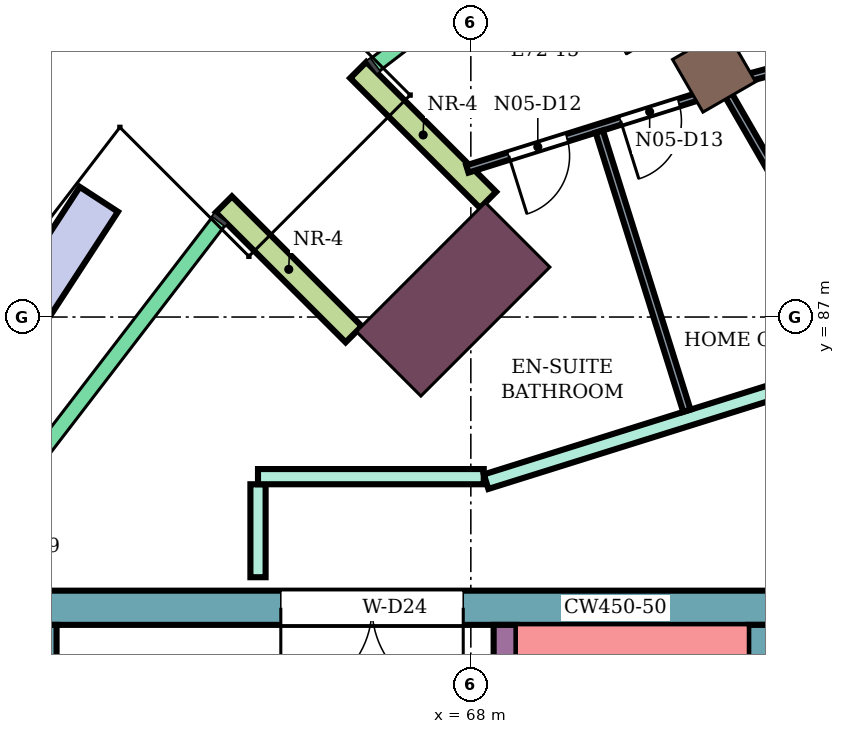
"""IFC4 building model, lengths in metres.
Left out: names, types, materials, properties, quantities, classifications, styles, units other than length and angle.
Written with IfcOpenShell. Run it as: python <this file> out.ifc"""

import sys

from ifc_helpers import new_model, si_unit, direction, frame, frame_2d, origin, origin_2d, place, context, subcontext, project, spatial, rectangle, extrude, element, fill, save


model = new_model("IFC4")
c1 = context("Model", 3, precision=1e-05, world=origin(), true_north=direction((0.0, 1.0)))
c2 = subcontext(c1, "Body", "Model", "MODEL_VIEW")
j1 = project(units=[si_unit("LENGTHUNIT", "METRE"), si_unit("PLANEANGLEUNIT", "RADIAN")], contexts=[c1])
p1 = place(None, origin())
s1 = spatial("IfcSite", under=j1, at=p1, CompositionType="ELEMENT")
p2 = place(p1, origin())
s2 = spatial("IfcBuilding", under=s1, at=p2, CompositionType="ELEMENT")
p3 = place(p2, frame((0.0, 0.0, 314.9)))
s3 = spatial("IfcBuildingStorey", under=s2, at=p3, CompositionType="ELEMENT", Elevation=314.9)
p4 = place(p3, frame((71.2, 90.242, 0.0), z_axis=(0.0, 0.0, 1.0), x_axis=(-0.5, 0.866025403784, 0.0)))
e1 = element("IfcColumn", 1, at=p4, inside=s3, PredefinedType="COLUMN", context=c2, shape_type="SweptSolid", body=[
    extrude(rectangle(XDim=0.8, YDim=0.8, at=origin_2d()), origin(), (0.0, 0.0, 1.0), 4.4),
])
p5 = place(p3, frame((67.767, 87.233, 0.0), z_axis=(0.0, 0.0, 1.0), x_axis=(-0.707106781187, 0.707106781187, 0.0)))
e2 = element("IfcColumn", 2, at=p5, inside=s3, PredefinedType="COLUMN", context=c2, shape_type="SweptSolid", body=[
    extrude(rectangle(XDim=1.2, YDim=2.4, at=origin_2d()), origin(), (0.0, 0.0, 1.0), 4.4),
])
p6 = place(p3, frame((72.1, 83.175, 0.0), z_axis=(0.0, 0.0, 1.0), x_axis=(-1.0, 0.0, 0.0)))
e3 = element("IfcWall", 3, at=p6, inside=s3, PredefinedType="SHEAR", context=c2, shape_type="SweptSolid", body=[
    extrude(rectangle(XDim=10.0, YDim=0.45, at=frame_2d((5.0, 0.0))), origin(), (0.0, 0.0, 1.0), 4.08),
])
p7 = place(p6, frame((4.2, 0.0, 0.0)))
e4 = element("IfcOpeningElement", 4, at=p7, cuts=e3, PredefinedType="OPENING", context=c2, shape_type="SweptSolid", body=[
    extrude(rectangle(XDim=2.4, YDim=2.4, at=frame_2d((1.2, 1.2))), frame((0.0, 0.235, 0.0), z_axis=(0.0, -1.0, 0.0), x_axis=(1.0, 0.0, 0.0)), (0.0, 0.0, 1.0), 0.47),
])
p8 = place(p3, frame((71.875, 82.95, 0.0), z_axis=(0.0, 0.0, 1.0), x_axis=(0.0, -1.0, 0.0)))
e5 = element("IfcWall", 5, at=p8, inside=s3, PredefinedType="SHEAR", context=c2, shape_type="SweptSolid", body=[
    extrude(rectangle(XDim=7.95, YDim=0.45, at=frame_2d((3.975, 0.0))), origin(), (0.0, 0.0, 1.0), 4.08),
])
p9 = place(p3, frame((62.325, 82.95, 0.0), z_axis=(0.0, 0.0, 1.0), x_axis=(0.0, -1.0, 0.0)))
e6 = element("IfcWall", 6, at=p9, inside=s3, PredefinedType="SHEAR", context=c2, shape_type="SweptSolid", body=[
    extrude(rectangle(XDim=3.7, YDim=0.45, at=frame_2d((1.85, 0.0))), origin(), (0.0, 0.0, 1.0), 4.08),
])
p10 = place(p3, frame((68.45, 82.95, 0.0), z_axis=(0.0, 0.0, 1.0), x_axis=(0.0, -1.0, 0.0)))
e7 = element("IfcWall", 7, at=p10, inside=s3, PredefinedType="SHEAR", context=c2, shape_type="SweptSolid", body=[
    extrude(rectangle(XDim=7.95, YDim=0.3, at=frame_2d((3.975, 0.0))), origin(), (0.0, 0.0, 1.0), 4.08),
])
p11 = place(p10, frame((0.6, 0.0, 0.0)))
e8 = element("IfcOpeningElement", 8, at=p11, cuts=e7, PredefinedType="OPENING", context=c2, shape_type="SweptSolid", body=[
    extrude(rectangle(XDim=0.9, YDim=2.1, at=frame_2d((0.45, 1.05))), frame((0.0, 0.16, 0.0), z_axis=(0.0, -1.0, 0.0), x_axis=(1.0, 0.0, 0.0)), (0.0, 0.0, 1.0), 0.32),
])
for number, where, z_axis, x_axis in (
    (9, (68.227, 88.541, 0.0), (0.0, 0.0, 1.0), (-0.707, 0.707, 0.0)),
    (10, (66.459, 86.773, 0.0), (0.0, 0.0, 1.0), (-0.707, 0.707, 0.0)),
):
    element("IfcWall", number, at=place(p3, frame(where, z_axis=z_axis, x_axis=x_axis)), inside=s3, PredefinedType="NOTDEFINED", context=c2, shape_type="SweptSolid", body=[
        extrude(rectangle(XDim=2.416, YDim=0.3, at=frame_2d((1.208, 0.0))), origin(), (0.0, 0.0, 1.0), 4.4),
    ])
p12 = place(p3, frame((63.106, 88.549, 0.0), z_axis=(0.0, 0.0, 1.0), x_axis=(-0.545551817612, -0.838077093292, 0.0)))
e11 = element("IfcWall", 11, at=p12, inside=s3, PredefinedType="USERDEFINED", context=c2, shape_type="SweptSolid", body=[
    extrude(rectangle(XDim=2.497, YDim=0.6, at=frame_2d((1.249, 0.0))), origin(), (0.0, 0.0, 1.0), 0.6),
])
p13 = place(p3, frame((65.2, 83.577, 0.0), z_axis=(0.0, 0.0, 1.0), x_axis=(0.0, 1.0, 0.0)))
e12 = element("IfcWall", 12, at=p13, inside=s3, PredefinedType="PARTITIONING", context=c2, shape_type="SweptSolid", body=[
    extrude(rectangle(XDim=1.223, YDim=0.2, at=frame_2d((0.612, 0.0))), origin(), (0.0, 0.0, 1.0), 3.95),
])
p14 = place(p3, frame((65.2, 84.9, 0.0), z_axis=(0.0, 0.0, 1.0), x_axis=(1.0, 0.0, 0.0)))
e13 = element("IfcWall", 13, at=p14, inside=s3, PredefinedType="PARTITIONING", context=c2, shape_type="SweptSolid", body=[
    extrude(rectangle(XDim=2.97, YDim=0.2, at=frame_2d((1.485, 0.0))), origin(), (0.0, 0.0, 1.0), 3.95),
])
p15 = place(p3, frame((68.201, 84.834, 0.0), z_axis=(0.0, 0.0, 1.0), x_axis=(0.954232917497, 0.29906443982, 0.0)))
e14 = element("IfcWall", 14, at=p15, inside=s3, PredefinedType="PARTITIONING", context=c2, shape_type="SweptSolid", body=[
    extrude(rectangle(XDim=5.74, YDim=0.2, at=frame_2d((2.87, 0.0))), origin(), (0.0, 0.0, 1.0), 3.95),
])
p16 = place(p3, frame((67.954, 88.948, 0.0), z_axis=(0.0, 0.0, 1.0), x_axis=(0.954122535632, 0.299416410704, 0.0)))
e15 = element("IfcWall", 15, at=p16, inside=s3, PredefinedType="PARTITIONING", context=c2, shape_type="SweptSolid", body=[
    extrude(rectangle(XDim=3.482, YDim=0.1, at=frame_2d((1.741, 0.0))), origin(), (0.0, 0.0, 1.0), 3.95),
])
p17 = place(p16, frame((0.571, 0.0, 0.0)))
e16 = element("IfcOpeningElement", 16, at=p17, cuts=e15, PredefinedType="OPENING", context=c2, shape_type="SweptSolid", body=[
    extrude(rectangle(XDim=0.8, YDim=2.1, at=frame_2d((0.4, 1.05))), frame((0.0, 0.06, 0.0), z_axis=(0.0, -1.0, 0.0), x_axis=(1.0, 0.0, 0.0)), (0.0, 0.0, 1.0), 0.12),
])
p18 = place(p16, frame((2.114, 0.0, 0.0)))
e17 = element("IfcOpeningElement", 17, at=p18, cuts=e15, PredefinedType="OPENING", context=c2, shape_type="SweptSolid", body=[
    extrude(rectangle(XDim=0.8, YDim=2.1, at=frame_2d((0.4, 1.05))), frame((0.0, 0.06, 0.0), z_axis=(0.0, -1.0, 0.0), x_axis=(1.0, 0.0, 0.0)), (0.0, 0.0, 1.0), 0.12),
])
p19 = place(p3, frame((69.69, 89.44, 0.0), z_axis=(0.0, 0.0, 1.0), x_axis=(0.299260814267, -0.954171349939, 0.0)))
e18 = element("IfcWall", 18, at=p19, inside=s3, PredefinedType="PARTITIONING", context=c2, shape_type="SweptSolid", body=[
    extrude(rectangle(XDim=3.849, YDim=0.1, at=frame_2d((1.925, 0.0))), origin(), (0.0, 0.0, 1.0), 3.95),
])
p20 = place(p3, frame((69.855, 92.579, 0.0), z_axis=(0.0, 0.0, 1.0), x_axis=(0.499801463163, -0.866139998742, 0.0)))
e19 = element("IfcWall", 19, at=p20, inside=s3, PredefinedType="PARTITIONING", context=c2, shape_type="SweptSolid", body=[
    extrude(rectangle(XDim=6.955, YDim=0.1, at=frame_2d((3.478, 0.0))), origin(), (0.0, 0.0, 1.0), 3.95),
])
p21 = place(p20, frame((1.029, 0.0, 0.0)))
e20 = element("IfcOpeningElement", 20, at=p21, cuts=e19, PredefinedType="OPENING", context=c2, shape_type="SweptSolid", body=[
    extrude(rectangle(XDim=0.9, YDim=2.1, at=frame_2d((0.45, 1.05))), frame((0.0, 0.06, 0.0), z_axis=(0.0, -1.0, 0.0), x_axis=(1.0, 0.0, 0.0)), (0.0, 0.0, 1.0), 0.12),
])
p22 = place(p3, frame((71.375, 90.075, 0.0), z_axis=(0.0, 0.0, 1.0), x_axis=(0.965918685896, 0.258845691944, 0.0)))
e21 = element("IfcWall", 21, at=p22, inside=s3, PredefinedType="PARTITIONING", context=c2, shape_type="SweptSolid", body=[
    extrude(rectangle(XDim=4.379, YDim=0.1, at=frame_2d((2.189, 0.0))), origin(), (0.0, 0.0, 1.0), 3.95),
])
p23 = place(p17, frame((0.8, 0.0, 0.0), z_axis=(0.0, 0.0, 1.0), x_axis=(-1.0, 0.0, 0.0)))
e22 = element("IfcDoor", 22, at=p23, inside=s3, OperationType="SINGLE_SWING_RIGHT", PredefinedType="DOOR", context=c2, shape_type="SweptSolid", body=[
    extrude(rectangle(XDim=0.8, YDim=2.1, at=frame_2d((0.4, 1.05))), frame((0.0, 0.025, 0.0), z_axis=(0.0, -1.0, 0.0), x_axis=(1.0, 0.0, 0.0)), (0.0, 0.0, 1.0), 0.05),
])
fill(e16, e22)
p24 = place(p18, frame((0.8, 0.0, 0.0), z_axis=(0.0, 0.0, 1.0), x_axis=(-1.0, 0.0, 0.0)))
e23 = element("IfcDoor", 23, at=p24, inside=s3, OperationType="SINGLE_SWING_RIGHT", PredefinedType="DOOR", context=c2, shape_type="SweptSolid", body=[
    extrude(rectangle(XDim=0.8, YDim=2.1, at=frame_2d((0.4, 1.05))), frame((0.0, 0.025, 0.0), z_axis=(0.0, -1.0, 0.0), x_axis=(1.0, 0.0, 0.0)), (0.0, 0.0, 1.0), 0.05),
])
fill(e17, e23)
p25 = place(p7, origin())
e24 = element("IfcDoor", 24, at=p25, inside=s3, OperationType="DOUBLE_DOOR_SINGLE_SWING", PredefinedType="DOOR", context=c2, shape_type="SweptSolid", body=[
    extrude(rectangle(XDim=2.4, YDim=2.4, at=frame_2d((1.2, 1.2))), frame((0.0, 0.025, 0.0), z_axis=(0.0, -1.0, 0.0), x_axis=(1.0, 0.0, 0.0)), (0.0, 0.0, 1.0), 0.05),
])
fill(e4, e24)
save(model, sys.argv[1])
